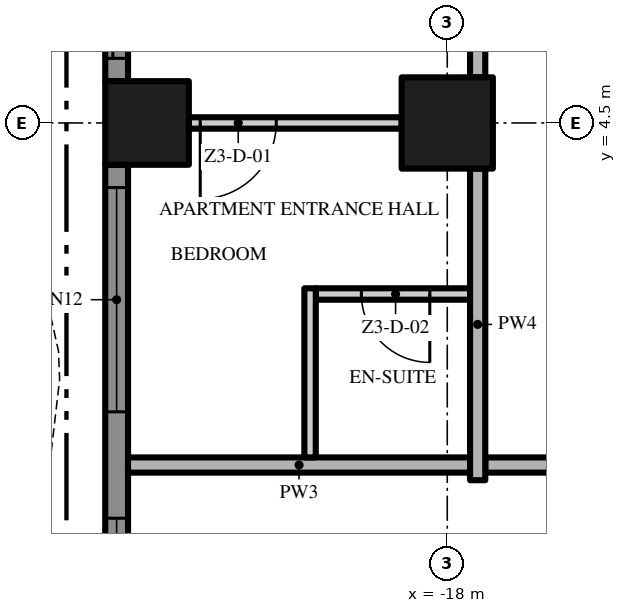
"""IFC4 building model, lengths in metres.
Left out: names, types, materials, properties, quantities, classifications, styles, units other than length and angle.
Written with IfcOpenShell. Run it as: python <this file> out.ifc"""

import sys

from ifc_helpers import new_model, si_unit, direction, frame, frame_2d, origin, origin_2d, place, context, subcontext, project, spatial, polyline, rectangle, outline, extrude, element, fill, save


model = new_model("IFC4")
c1 = context("Model", 3, precision=1e-05, world=origin(), true_north=direction((0.0, 1.0)))
c2 = subcontext(c1, "Body", "Model", "MODEL_VIEW")
j1 = project(units=[si_unit("LENGTHUNIT", "METRE"), si_unit("PLANEANGLEUNIT", "RADIAN")], contexts=[c1])
p1 = place(None, origin())
s1 = spatial("IfcSite", under=j1, at=p1, CompositionType="ELEMENT")
p2 = place(p1, origin())
s2 = spatial("IfcBuilding", under=s1, at=p2, CompositionType="ELEMENT")
p3 = place(p2, frame((0.0, 0.0, 163.0)))
s3 = spatial("IfcBuildingStorey", under=s2, at=p3, CompositionType="ELEMENT", Elevation=163.0)
p4 = place(p3, frame((-18.0, 4.5, 0.0), z_axis=(0.0, 0.0, 1.0), x_axis=(1.0, 0.0, 0.0)))
e1 = element("IfcColumn", 1, at=p4, inside=s3, PredefinedType="COLUMN", context=c2, shape_type="SweptSolid", body=[
    extrude(rectangle(XDim=1.2, YDim=1.2, at=origin_2d()), origin(), (0.0, 0.0, 1.0), 3.5),
])
p5 = place(p3, frame((-21.95, 4.5, 0.0), z_axis=(0.0, 0.0, 1.0), x_axis=(1.0, 0.0, 0.0)))
e2 = element("IfcColumn", 2, at=p5, inside=s3, PredefinedType="COLUMN", context=c2, shape_type="SweptSolid", body=[
    extrude(rectangle(XDim=1.1, YDim=1.1, at=origin_2d()), origin(), (0.0, 0.0, 1.0), 3.5),
])
p6 = place(p3, frame((-22.35, 5.05, 0.0), z_axis=(0.0, 0.0, 1.0), x_axis=(0.0, 1.0, 0.0)))
e3 = element("IfcWall", 3, at=p6, inside=s3, PredefinedType="SOLIDWALL", context=c2, shape_type="SweptSolid", body=[
    extrude(rectangle(XDim=7.9, YDim=0.3, at=frame_2d((3.95, 0.0))), origin(), (0.0, 0.0, 1.0), 3.5),
])
p7 = place(p6, frame((4.65, 0.0, 0.0)))
e4 = element("IfcOpeningElement", 4, at=p7, cuts=e3, PredefinedType="OPENING", context=c2, shape_type="SweptSolid", body=[
    extrude(rectangle(XDim=2.95, YDim=2.4, at=frame_2d((1.475, 1.2))), frame((0.0, 0.16, 0.0), z_axis=(0.0, -1.0, 0.0), x_axis=(1.0, 0.0, 0.0)), (0.0, 0.0, 1.0), 0.32),
])
p8 = place(p6, frame((0.3, 0.0, 0.0)))
e5 = element("IfcOpeningElement", 5, at=p8, cuts=e3, PredefinedType="OPENING", context=c2, shape_type="SweptSolid", body=[
    extrude(rectangle(XDim=2.95, YDim=2.4, at=frame_2d((1.475, 1.2))), frame((0.0, 0.16, 0.0), z_axis=(0.0, -1.0, 0.0), x_axis=(1.0, 0.0, 0.0)), (0.0, 0.0, 1.0), 0.32),
])
p9 = place(p3, frame((-22.35, -3.95, 0.0), z_axis=(0.0, 0.0, 1.0), x_axis=(0.0, 1.0, 0.0)))
e6 = element("IfcWall", 6, at=p9, inside=s3, PredefinedType="SOLIDWALL", context=c2, shape_type="SweptSolid", body=[
    extrude(rectangle(XDim=7.9, YDim=0.3, at=frame_2d((3.95, 0.0))), origin(), (0.0, 0.0, 1.0), 3.5),
])
p10 = place(p9, frame((4.65, 0.0, 0.45)))
e7 = element("IfcOpeningElement", 7, at=p10, cuts=e6, PredefinedType="OPENING", context=c2, shape_type="SweptSolid", body=[
    extrude(rectangle(XDim=2.95, YDim=2.65, at=frame_2d((1.475, 1.325))), frame((0.0, 0.16, 0.0), z_axis=(0.0, -1.0, 0.0), x_axis=(1.0, 0.0, 0.0)), (0.0, 0.0, 1.0), 0.32),
])
p11 = place(p9, frame((0.3, 0.0, 0.45)))
e8 = element("IfcOpeningElement", 8, at=p11, cuts=e6, PredefinedType="OPENING", context=c2, shape_type="SweptSolid", body=[
    extrude(rectangle(XDim=2.95, YDim=2.65, at=frame_2d((1.475, 1.325))), frame((0.0, 0.16, 0.0), z_axis=(0.0, -1.0, 0.0), x_axis=(1.0, 0.0, 0.0)), (0.0, 0.0, 1.0), 0.32),
])
p12 = place(p3, origin())
e9 = element("IfcWall", 9, at=p12, inside=s3, PredefinedType="USERDEFINED", context=c2, shape_type="SweptSolid", body=[
    extrude(outline(polyline([(-23.451, 18.0), (-23.115, 16.5), (-23.1, 16.125), (-23.231, 15.0), (-23.755, 13.5), (-24.488, 12.0), (-25.149, 10.5), (-25.485, 9.0), (-25.5, 8.625), (-25.369, 7.5), (-24.845, 6.0), (-24.112, 4.5), (-23.451, 3.0), (-23.115, 1.5), (-23.1, 1.125), (-23.231, 0.0), (-23.755, -1.5), (-24.488, -3.0), (-25.149, -4.5), (-25.485, -6.0), (-25.5, -6.375), (-25.369, -7.5), (-24.845, -9.0), (-24.112, -10.5), (-23.451, -12.0), (-23.115, -13.5), (-22.871, -13.445), (-23.213, -11.921), (-23.885, -10.395), (-24.614, -8.904), (-25.124, -7.444), (-25.249, -6.365), (-25.236, -6.033), (-24.91, -4.579), (-24.261, -3.105), (-23.524, -1.596), (-22.986, -0.056), (-22.849, 1.115), (-22.866, 1.533), (-23.213, 3.079), (-23.885, 4.605), (-24.614, 6.096), (-25.124, 7.556), (-25.249, 8.635), (-25.236, 8.967), (-24.91, 10.421), (-24.261, 11.895), (-23.524, 13.404), (-22.986, 14.944), (-22.849, 16.115), (-22.866, 16.533), (-23.208, 18.055), (-23.451, 18.0)])), origin(), (0.0, 0.0, 1.0), 0.9),
])
p13 = place(p3, frame((17.5, 0.0, 0.0), z_axis=(0.0, 0.0, 1.0), x_axis=(-1.0, 0.0, 0.0)))
e10 = element("IfcWall", 10, at=p13, inside=s3, PredefinedType="PARTITIONING", context=c2, shape_type="SweptSolid", body=[
    extrude(rectangle(XDim=35.0, YDim=0.2, at=frame_2d((17.5, 0.0))), origin(), (0.0, 0.0, 1.0), 3.5),
])
p14 = place(p13, frame((23.5, 0.0, 0.0)))
e11 = element("IfcOpeningElement", 11, at=p14, cuts=e10, PredefinedType="OPENING", context=c2, shape_type="SweptSolid", body=[
    extrude(rectangle(XDim=1.5, YDim=2.4, at=frame_2d((0.75, 1.2))), frame((0.0, 0.11, 0.0), z_axis=(0.0, -1.0, 0.0), x_axis=(1.0, 0.0, 0.0)), (0.0, 0.0, 1.0), 0.22),
])
p15 = place(p13, frame((5.5, 0.0, 0.0)))
e12 = element("IfcOpeningElement", 12, at=p15, cuts=e10, PredefinedType="OPENING", context=c2, shape_type="SweptSolid", body=[
    extrude(rectangle(XDim=1.5, YDim=2.4, at=frame_2d((0.75, 1.2))), frame((0.0, 0.11, 0.0), z_axis=(0.0, -1.0, 0.0), x_axis=(1.0, 0.0, 0.0)), (0.0, 0.0, 1.0), 0.22),
])
p16 = place(p3, frame((-22.2, 0.0, 0.0), z_axis=(0.0, 0.0, 1.0), x_axis=(1.0, 0.0, 0.0)))
e13 = element("IfcWall", 13, at=p16, inside=s3, PredefinedType="PARTITIONING", context=c2, shape_type="SweptSolid", body=[
    extrude(rectangle(XDim=4.5, YDim=0.2, at=frame_2d((2.25, 0.0))), origin(), (0.0, 0.0, 1.0), 3.5),
])
p17 = place(p3, frame((-17.7, 2.25, 0.0), z_axis=(0.0, 0.0, 1.0), x_axis=(-1.0, 0.0, 0.0)))
e14 = element("IfcWall", 14, at=p17, inside=s3, PredefinedType="PARTITIONING", context=c2, shape_type="SweptSolid", body=[
    extrude(rectangle(XDim=2.03, YDim=0.15, at=frame_2d((1.015, 0.0))), origin(), (0.0, 0.0, 1.0), 3.5),
])
p18 = place(p17, frame((0.53, 0.0, 0.0)))
e15 = element("IfcOpeningElement", 15, at=p18, cuts=e14, PredefinedType="OPENING", context=c2, shape_type="SweptSolid", body=[
    extrude(rectangle(XDim=0.9, YDim=2.1, at=frame_2d((0.45, 1.05))), frame((0.0, 0.085, 0.0), z_axis=(0.0, -1.0, 0.0), x_axis=(1.0, 0.0, 0.0)), (0.0, 0.0, 1.0), 0.17),
])
p19 = place(p3, frame((-18.6, 4.5, 0.0), z_axis=(0.0, 0.0, 1.0), x_axis=(-1.0, 0.0, 0.0)))
e16 = element("IfcWall", 16, at=p19, inside=s3, PredefinedType="PARTITIONING", context=c2, shape_type="SweptSolid", body=[
    extrude(rectangle(XDim=2.8, YDim=0.15, at=frame_2d((1.4, 0.0))), origin(), (0.0, 0.0, 1.0), 3.5),
])
p20 = place(p19, frame((1.65, 0.0, 0.0)))
e17 = element("IfcOpeningElement", 17, at=p20, cuts=e16, PredefinedType="OPENING", context=c2, shape_type="SweptSolid", body=[
    extrude(rectangle(XDim=1.0, YDim=2.4, at=frame_2d((0.5, 1.2))), frame((0.0, 0.085, 0.0), z_axis=(0.0, -1.0, 0.0), x_axis=(1.0, 0.0, 0.0)), (0.0, 0.0, 1.0), 0.17),
])
p21 = place(p3, frame((-19.805, 0.1, 0.0), z_axis=(0.0, 0.0, 1.0), x_axis=(0.0, 1.0, 0.0)))
e18 = element("IfcWall", 18, at=p21, inside=s3, PredefinedType="PARTITIONING", context=c2, shape_type="SweptSolid", body=[
    extrude(rectangle(XDim=2.225, YDim=0.15, at=frame_2d((1.113, 0.0))), origin(), (0.0, 0.0, 1.0), 3.5),
])
p22 = place(p3, frame((-17.6, -0.2, 0.0), z_axis=(0.0, 0.0, 1.0), x_axis=(0.0, 1.0, 0.0)))
e19 = element("IfcWall", 19, at=p22, inside=s3, PredefinedType="PARTITIONING", context=c2, shape_type="SweptSolid", body=[
    extrude(rectangle(XDim=4.1, YDim=0.2, at=frame_2d((2.05, 0.0))), origin(), (0.0, 0.0, 1.0), 3.5),
])
p23 = place(p3, frame((-17.6, 5.1, 0.0), z_axis=(0.0, 0.0, 1.0), x_axis=(0.0, 1.0, 0.0)))
e20 = element("IfcWall", 20, at=p23, inside=s3, PredefinedType="PARTITIONING", context=c2, shape_type="SweptSolid", body=[
    extrude(rectangle(XDim=7.8, YDim=0.2, at=frame_2d((3.9, 0.0))), origin(), (0.0, 0.0, 1.0), 3.5),
])
p24 = place(p23, frame((1.05, 0.0, 0.0)))
e21 = element("IfcOpeningElement", 21, at=p24, cuts=e20, PredefinedType="OPENING", context=c2, shape_type="SweptSolid", body=[
    extrude(rectangle(XDim=1.2, YDim=2.4, at=frame_2d((0.6, 1.2))), frame((0.0, 0.11, 0.0), z_axis=(0.0, -1.0, 0.0), x_axis=(1.0, 0.0, 0.0)), (0.0, 0.0, 1.0), 0.22),
])
p25 = place(p8, origin())
e22 = element("IfcDoor", 22, at=p25, inside=s3, OperationType="SINGLE_SWING_LEFT", PredefinedType="DOOR", context=c2, shape_type="SweptSolid", body=[
    extrude(rectangle(XDim=2.95, YDim=2.4, at=frame_2d((1.475, 1.2))), frame((0.0, 0.025, 0.0), z_axis=(0.0, -1.0, 0.0), x_axis=(1.0, 0.0, 0.0)), (0.0, 0.0, 1.0), 0.05),
])
fill(e5, e22)
p26 = place(p10, origin())
e23 = element("IfcWindow", 23, at=p26, inside=s3, PartitioningType="SINGLE_PANEL", PredefinedType="WINDOW", context=c2, shape_type="SweptSolid", body=[
    extrude(rectangle(XDim=2.95, YDim=2.65, at=frame_2d((1.475, 1.325))), frame((0.0, 0.03, 0.0), z_axis=(0.0, -1.0, 0.0), x_axis=(1.0, 0.0, 0.0)), (0.0, 0.0, 1.0), 0.06),
])
fill(e7, e23)
p27 = place(p11, origin())
e24 = element("IfcWindow", 24, at=p27, inside=s3, PartitioningType="SINGLE_PANEL", PredefinedType="WINDOW", context=c2, shape_type="SweptSolid", body=[
    extrude(rectangle(XDim=2.95, YDim=2.65, at=frame_2d((1.475, 1.325))), frame((0.0, 0.03, 0.0), z_axis=(0.0, -1.0, 0.0), x_axis=(1.0, 0.0, 0.0)), (0.0, 0.0, 1.0), 0.06),
])
fill(e8, e24)
p28 = place(p20, origin())
e25 = element("IfcDoor", 25, at=p28, inside=s3, OperationType="SINGLE_SWING_RIGHT", PredefinedType="DOOR", context=c2, shape_type="SweptSolid", body=[
    extrude(rectangle(XDim=1.0, YDim=2.4, at=frame_2d((0.5, 1.2))), frame((0.0, 0.025, 0.0), z_axis=(0.0, -1.0, 0.0), x_axis=(1.0, 0.0, 0.0)), (0.0, 0.0, 1.0), 0.05),
])
fill(e17, e25)
p29 = place(p18, origin())
e26 = element("IfcDoor", 26, at=p29, inside=s3, OperationType="SINGLE_SWING_LEFT", PredefinedType="DOOR", context=c2, shape_type="SweptSolid", body=[
    extrude(rectangle(XDim=0.9, YDim=2.1, at=frame_2d((0.45, 1.05))), frame((0.0, 0.025, 0.0), z_axis=(0.0, -1.0, 0.0), x_axis=(1.0, 0.0, 0.0)), (0.0, 0.0, 1.0), 0.05),
])
fill(e15, e26)
save(model, sys.argv[1])
